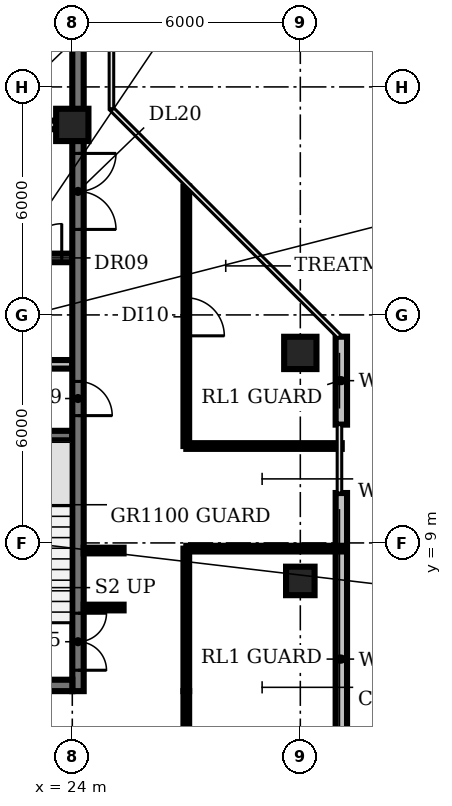
"""IFC4 building model, lengths in metres.
Left out: names, types, materials, properties, quantities, classifications, styles, units other than length and angle.
Written with IfcOpenShell. Run it as: python <this file> out.ifc"""

import sys

from ifc_helpers import new_model, si_unit, direction, frame, frame_2d, origin, origin_2d, place, context, subcontext, project, spatial, rectangle, circle, extrude, element, fill, save


model = new_model("IFC4")
c1 = context("Model", 3, precision=1e-05, world=origin(), true_north=direction((0.0, 1.0)))
c2 = subcontext(c1, "Body", "Model", "MODEL_VIEW")
j1 = project(units=[si_unit("LENGTHUNIT", "METRE"), si_unit("PLANEANGLEUNIT", "RADIAN")], contexts=[c1])
p1 = place(None, origin())
s1 = spatial("IfcSite", under=j1, at=p1, CompositionType="ELEMENT")
p2 = place(p1, origin())
s2 = spatial("IfcBuilding", under=s1, at=p2, CompositionType="ELEMENT")
p3 = place(p2, frame((0.0, 0.0, 285.2)))
s3 = spatial("IfcBuildingStorey", under=s2, at=p3, CompositionType="ELEMENT", Elevation=285.2)
p4 = place(p3, frame((24.0, 20.0, 0.0), z_axis=(0.0, 0.0, 1.0), x_axis=(1.0, 0.0, 0.0)))
e1 = element("IfcColumn", 1, at=p4, inside=s3, PredefinedType="COLUMN", context=c2, shape_type="SweptSolid", body=[
    extrude(circle(Radius=0.425, at=origin_2d()), origin(), (0.0, 0.0, 1.0), 3.85),
])
p5 = place(p3, frame((30.0, 8.0, 0.0), z_axis=(0.0, 0.0, 1.0), x_axis=(1.0, 0.0, 0.0)))
e2 = element("IfcColumn", 2, at=p5, inside=s3, PredefinedType="COLUMN", context=c2, shape_type="SweptSolid", body=[
    extrude(rectangle(XDim=0.75, YDim=0.75, at=origin_2d()), origin(), (0.0, 0.0, 1.0), 3.85),
])
p6 = place(p3, frame((30.0, 14.0, 0.0), z_axis=(0.0, 0.0, 1.0), x_axis=(1.0, 0.0, 0.0)))
e3 = element("IfcColumn", 3, at=p6, inside=s3, PredefinedType="COLUMN", context=c2, shape_type="SweptSolid", body=[
    extrude(circle(Radius=0.425, at=origin_2d()), origin(), (0.0, 0.0, 1.0), 3.85),
])
p7 = place(p3, frame((31.08, 1.573, 0.0), z_axis=(0.0, 0.0, 1.0), x_axis=(0.0, 1.0, 0.0)))
e4 = element("IfcWall", 4, at=p7, inside=s3, PredefinedType="SOLIDWALL", context=c2, shape_type="SweptSolid", body=[
    extrude(rectangle(XDim=8.74, YDim=0.3, at=frame_2d((4.37, 0.0))), origin(), (0.0, 0.0, 1.0), 3.85),
])
p8 = place(p3, frame((31.08, 12.113, 0.0), z_axis=(0.0, 0.0, 1.0), x_axis=(0.0, 1.0, 0.0)))
e5 = element("IfcWall", 5, at=p8, inside=s3, PredefinedType="SOLIDWALL", context=c2, shape_type="SweptSolid", body=[
    extrude(rectangle(XDim=2.313, YDim=0.3, at=frame_2d((1.157, 0.0))), origin(), (0.0, 0.0, 1.0), 3.85),
])
p9 = place(p3, frame((20.85, 11.825, 0.0), z_axis=(0.0, 0.0, 1.0), x_axis=(1.0, 0.0, 0.0)))
e6 = element("IfcWall", 6, at=p9, inside=s3, PredefinedType="SHEAR", context=c2, shape_type="SweptSolid", body=[
    extrude(rectangle(XDim=3.15, YDim=0.25, at=frame_2d((1.575, 0.0))), origin(), (0.0, 0.0, 1.0), 3.85),
])
p10 = place(p3, frame((16.6, 13.7, 0.0), z_axis=(0.0, 0.0, 1.0), x_axis=(1.0, 0.0, 0.0)))
e7 = element("IfcWall", 7, at=p10, inside=s3, PredefinedType="PARTITIONING", context=c2, shape_type="SweptSolid", body=[
    extrude(rectangle(XDim=7.4, YDim=0.225, at=frame_2d((3.7, 0.0))), origin(), (0.0, 0.0, 1.0), 3.85),
])
p11 = place(p3, frame((9.4, 16.5, 0.0), z_axis=(0.0, 0.0, 1.0), x_axis=(1.0, 0.0, 0.0)))
e8 = element("IfcWall", 8, at=p11, inside=s3, PredefinedType="PARTITIONING", context=c2, shape_type="SweptSolid", body=[
    extrude(rectangle(XDim=14.6, YDim=0.225, at=frame_2d((7.3, 0.0))), origin(), (0.0, 0.0, 1.0), 3.85),
])
p12 = place(p11, frame((0.55, 0.0, 0.0)))
e9 = element("IfcOpeningElement", 9, at=p12, cuts=e8, PredefinedType="OPENING", context=c2, shape_type="SweptSolid", body=[
    extrude(rectangle(XDim=0.9, YDim=2.1, at=frame_2d((0.45, 1.05))), frame((0.0, 0.123, 0.0), z_axis=(0.0, -1.0, 0.0), x_axis=(1.0, 0.0, 0.0)), (0.0, 0.0, 1.0), 0.245),
])
p13 = place(p11, frame((6.075, 0.0, 0.0)))
e10 = element("IfcOpeningElement", 10, at=p13, cuts=e8, PredefinedType="OPENING", context=c2, shape_type="SweptSolid", body=[
    extrude(rectangle(XDim=1.0, YDim=2.1, at=frame_2d((0.5, 1.05))), frame((0.0, 0.123, 0.0), z_axis=(0.0, -1.0, 0.0), x_axis=(1.0, 0.0, 0.0)), (0.0, 0.0, 1.0), 0.245),
])
p14 = place(p11, frame((11.647, 0.0, 0.0)))
e11 = element("IfcOpeningElement", 11, at=p14, cuts=e8, PredefinedType="OPENING", context=c2, shape_type="SweptSolid", body=[
    extrude(rectangle(XDim=0.9, YDim=2.1, at=frame_2d((0.45, 1.05))), frame((0.0, 0.123, 0.0), z_axis=(0.0, -1.0, 0.0), x_axis=(1.0, 0.0, 0.0)), (0.0, 0.0, 1.0), 0.245),
])
p15 = place(p11, frame((13.423, 0.0, 0.0)))
e12 = element("IfcOpeningElement", 12, at=p15, cuts=e8, PredefinedType="OPENING", context=c2, shape_type="SweptSolid", body=[
    extrude(rectangle(XDim=0.9, YDim=2.1, at=frame_2d((0.45, 1.05))), frame((0.0, 0.123, 0.0), z_axis=(0.0, -1.0, 0.0), x_axis=(1.0, 0.0, 0.0)), (0.0, 0.0, 1.0), 0.245),
])
p16 = place(p3, frame((24.0, 20.0, 0.0), z_axis=(0.0, 0.0, 1.0), x_axis=(-1.0, 0.0, 0.0)))
e13 = element("IfcWall", 13, at=p16, inside=s3, PredefinedType="PARTITIONING", context=c2, shape_type="SweptSolid", body=[
    extrude(rectangle(XDim=14.6, YDim=0.225, at=frame_2d((7.3, 0.0))), origin(), (0.0, 0.0, 1.0), 3.85),
])
p17 = place(p16, frame((12.75, 0.0, 0.0)))
e14 = element("IfcOpeningElement", 14, at=p17, cuts=e13, PredefinedType="OPENING", context=c2, shape_type="SweptSolid", body=[
    extrude(rectangle(XDim=1.1, YDim=2.1, at=frame_2d((0.55, 1.05))), frame((0.0, 0.123, 0.0), z_axis=(0.0, -1.0, 0.0), x_axis=(1.0, 0.0, 0.0)), (0.0, 0.0, 1.0), 0.245),
])
p18 = place(p16, frame((9.95, 0.0, 0.0)))
e15 = element("IfcOpeningElement", 15, at=p18, cuts=e13, PredefinedType="OPENING", context=c2, shape_type="SweptSolid", body=[
    extrude(rectangle(XDim=1.1, YDim=2.1, at=frame_2d((0.55, 1.05))), frame((0.0, 0.123, 0.0), z_axis=(0.0, -1.0, 0.0), x_axis=(1.0, 0.0, 0.0)), (0.0, 0.0, 1.0), 0.245),
])
p19 = place(p16, frame((7.15, 0.0, 0.0)))
e16 = element("IfcOpeningElement", 16, at=p19, cuts=e13, PredefinedType="OPENING", context=c2, shape_type="SweptSolid", body=[
    extrude(rectangle(XDim=1.1, YDim=2.1, at=frame_2d((0.55, 1.05))), frame((0.0, 0.123, 0.0), z_axis=(0.0, -1.0, 0.0), x_axis=(1.0, 0.0, 0.0)), (0.0, 0.0, 1.0), 0.245),
])
p20 = place(p16, frame((4.35, 0.0, 0.0)))
e17 = element("IfcOpeningElement", 17, at=p20, cuts=e13, PredefinedType="OPENING", context=c2, shape_type="SweptSolid", body=[
    extrude(rectangle(XDim=1.1, YDim=2.1, at=frame_2d((0.55, 1.05))), frame((0.0, 0.123, 0.0), z_axis=(0.0, -1.0, 0.0), x_axis=(1.0, 0.0, 0.0)), (0.0, 0.0, 1.0), 0.245),
])
p21 = place(p16, frame((2.137, 0.0, 0.0)))
e18 = element("IfcOpeningElement", 18, at=p21, cuts=e13, PredefinedType="OPENING", context=c2, shape_type="SweptSolid", body=[
    extrude(rectangle(XDim=0.9, YDim=2.1, at=frame_2d((0.45, 1.05))), frame((0.0, 0.123, 0.0), z_axis=(0.0, -1.0, 0.0), x_axis=(1.0, 0.0, 0.0)), (0.0, 0.0, 1.0), 0.245),
])
p22 = place(p16, frame((0.612, 0.0, 0.0)))
e19 = element("IfcOpeningElement", 19, at=p22, cuts=e13, PredefinedType="OPENING", context=c2, shape_type="SweptSolid", body=[
    extrude(rectangle(XDim=0.9, YDim=2.1, at=frame_2d((0.45, 1.05))), frame((0.0, 0.123, 0.0), z_axis=(0.0, -1.0, 0.0), x_axis=(1.0, 0.0, 0.0)), (0.0, 0.0, 1.0), 0.245),
])
p23 = place(p3, frame((24.15, 25.655, 0.0), z_axis=(0.0, 0.0, 1.0), x_axis=(0.0, -1.0, 0.0)))
e20 = element("IfcWall", 20, at=p23, inside=s3, PredefinedType="SHEAR", context=c2, shape_type="SweptSolid", body=[
    extrude(rectangle(XDim=20.555, YDim=0.3, at=frame_2d((10.277, 0.0))), origin(), (0.0, 0.0, 1.0), 3.85),
])
p24 = place(p23, frame((18.505, 0.0, 0.0)))
e21 = element("IfcOpeningElement", 21, at=p24, cuts=e20, PredefinedType="OPENING", context=c2, shape_type="SweptSolid", body=[
    extrude(rectangle(XDim=1.5, YDim=2.1, at=frame_2d((0.75, 1.05))), frame((0.0, 0.16, 0.0), z_axis=(0.0, -1.0, 0.0), x_axis=(1.0, 0.0, 0.0)), (0.0, 0.0, 1.0), 0.32),
])
p25 = place(p23, frame((12.405, 0.0, 0.0)))
e22 = element("IfcOpeningElement", 22, at=p25, cuts=e20, PredefinedType="OPENING", context=c2, shape_type="SweptSolid", body=[
    extrude(rectangle(XDim=0.9, YDim=2.1, at=frame_2d((0.45, 1.05))), frame((0.0, 0.16, 0.0), z_axis=(0.0, -1.0, 0.0), x_axis=(1.0, 0.0, 0.0)), (0.0, 0.0, 1.0), 0.32),
])
p26 = place(p23, frame((6.405, 0.0, 0.0)))
e23 = element("IfcOpeningElement", 23, at=p26, cuts=e20, PredefinedType="OPENING", context=c2, shape_type="SweptSolid", body=[
    extrude(rectangle(XDim=2.0, YDim=2.1, at=frame_2d((1.0, 1.05))), frame((0.0, 0.16, 0.0), z_axis=(0.0, -1.0, 0.0), x_axis=(1.0, 0.0, 0.0)), (0.0, 0.0, 1.0), 0.32),
])
p27 = place(p3, frame((24.0, 5.25, 0.0), z_axis=(0.0, 0.0, 1.0), x_axis=(-1.0, 0.0, 0.0)))
e24 = element("IfcWall", 24, at=p27, inside=s3, PredefinedType="SHEAR", context=c2, shape_type="SweptSolid", body=[
    extrude(rectangle(XDim=18.0, YDim=0.3, at=frame_2d((9.0, 0.0))), origin(), (0.0, 0.0, 1.0), 3.85),
])
p28 = place(p27, frame((13.0, 0.0, 0.0)))
e25 = element("IfcOpeningElement", 25, at=p28, cuts=e24, PredefinedType="OPENING", context=c2, shape_type="SweptSolid", body=[
    extrude(rectangle(XDim=1.2, YDim=2.1, at=frame_2d((0.6, 1.05))), frame((0.0, 0.16, 0.0), z_axis=(0.0, -1.0, 0.0), x_axis=(1.0, 0.0, 0.0)), (0.0, 0.0, 1.0), 0.32),
])
p29 = place(p27, frame((4.9, 0.0, 0.0)))
e26 = element("IfcOpeningElement", 26, at=p29, cuts=e24, PredefinedType="OPENING", context=c2, shape_type="SweptSolid", body=[
    extrude(rectangle(XDim=1.0, YDim=2.1, at=frame_2d((0.5, 1.05))), frame((0.0, 0.16, 0.0), z_axis=(0.0, -1.0, 0.0), x_axis=(1.0, 0.0, 0.0)), (0.0, 0.0, 1.0), 0.32),
])
for number, where, z_axis, x_axis in (
    (27, (24.3, 7.3, 0.0), (0.0, 0.0, 1.0), (1.0, 0.0, 0.0)),
    (28, (24.3, 8.8, 0.0), (0.0, 0.0, 1.0), (1.0, 0.0, 0.0)),
):
    element("IfcWall", number, at=place(p3, frame(where, z_axis=z_axis, x_axis=x_axis)), inside=s3, PredefinedType="PARTITIONING", context=c2, shape_type="SweptSolid", body=[
        extrude(rectangle(XDim=1.05, YDim=0.15, at=frame_2d((0.525, 0.0))), origin(), (0.0, 0.0, 1.0), 2.9),
    ])
p30 = place(p3, frame((27.0, 5.1, 0.0), z_axis=(0.0, 0.0, 1.0), x_axis=(0.0, -1.0, 0.0)))
e29 = element("IfcWall", 29, at=p30, inside=s3, PredefinedType="PARTITIONING", context=c2, shape_type="SweptSolid", body=[
    extrude(rectangle(XDim=3.9, YDim=0.15, at=frame_2d((1.95, 0.0))), origin(), (0.0, 0.0, 1.0), 2.9),
])
p31 = place(p30, frame((1.5, 0.0, 0.0)))
e30 = element("IfcOpeningElement", 30, at=p31, cuts=e29, PredefinedType="OPENING", context=c2, shape_type="SweptSolid", body=[
    extrude(rectangle(XDim=1.0, YDim=2.1, at=frame_2d((0.5, 1.05))), frame((0.0, 0.085, 0.0), z_axis=(0.0, -1.0, 0.0), x_axis=(1.0, 0.0, 0.0)), (0.0, 0.0, 1.0), 0.17),
])
p32 = place(p3, frame((27.0, 5.1, 0.0), z_axis=(0.0, 0.0, 1.0), x_axis=(0.0, 1.0, 0.0)))
e31 = element("IfcWall", 31, at=p32, inside=s3, PredefinedType="PARTITIONING", context=c2, shape_type="SweptSolid", body=[
    extrude(rectangle(XDim=3.75, YDim=0.15, at=frame_2d((1.875, 0.0))), origin(), (0.0, 0.0, 1.0), 2.9),
])
for number, where, z_axis, x_axis in (
    (32, (27.0, 8.85, 0.0), (0.0, 0.0, 1.0), (1.0, 0.0, 0.0)),
    (33, (27.0, 11.55, 0.0), (0.0, 0.0, 1.0), (1.0, 0.0, 0.0)),
):
    element("IfcWall", number, at=place(p3, frame(where, z_axis=z_axis, x_axis=x_axis)), inside=s3, PredefinedType="PARTITIONING", context=c2, shape_type="SweptSolid", body=[
        extrude(rectangle(XDim=4.09, YDim=0.15, at=frame_2d((2.045, 0.0))), origin(), (0.0, 0.0, 1.0), 2.9),
    ])
p33 = place(p3, frame((27.0, 18.38, 0.0), z_axis=(0.0, 0.0, 1.0), x_axis=(0.0, -1.0, 0.0)))
e34 = element("IfcWall", 34, at=p33, inside=s3, PredefinedType="PARTITIONING", context=c2, shape_type="SweptSolid", body=[
    extrude(rectangle(XDim=6.83, YDim=0.15, at=frame_2d((3.415, 0.0))), origin(), (0.0, 0.0, 1.0), 2.9),
])
p34 = place(p33, frame((2.93, 0.0, 0.0)))
e35 = element("IfcOpeningElement", 35, at=p34, cuts=e34, PredefinedType="OPENING", context=c2, shape_type="SweptSolid", body=[
    extrude(rectangle(XDim=1.0, YDim=2.1, at=frame_2d((0.5, 1.05))), frame((0.0, 0.085, 0.0), z_axis=(0.0, -1.0, 0.0), x_axis=(1.0, 0.0, 0.0)), (0.0, 0.0, 1.0), 0.17),
])
p35 = place(p15, origin())
e36 = element("IfcDoor", 36, at=p35, inside=s3, OperationType="SINGLE_SWING_RIGHT", PredefinedType="DOOR", context=c2, shape_type="SweptSolid", body=[
    extrude(rectangle(XDim=0.9, YDim=2.1, at=frame_2d((0.45, 1.05))), frame((0.0, 0.025, 0.0), z_axis=(0.0, -1.0, 0.0), x_axis=(1.0, 0.0, 0.0)), (0.0, 0.0, 1.0), 0.05),
])
fill(e12, e36)
p36 = place(p24, origin())
e37 = element("IfcDoor", 37, at=p36, inside=s3, OperationType="DOUBLE_DOOR_SINGLE_SWING", PredefinedType="DOOR", context=c2, shape_type="SweptSolid", body=[
    extrude(rectangle(XDim=1.5, YDim=2.1, at=frame_2d((0.75, 1.05))), frame((0.0, 0.025, 0.0), z_axis=(0.0, -1.0, 0.0), x_axis=(1.0, 0.0, 0.0)), (0.0, 0.0, 1.0), 0.05),
])
fill(e21, e37)
p37 = place(p25, origin())
e38 = element("IfcDoor", 38, at=p37, inside=s3, OperationType="SINGLE_SWING_RIGHT", PredefinedType="DOOR", context=c2, shape_type="SweptSolid", body=[
    extrude(rectangle(XDim=0.9, YDim=2.1, at=frame_2d((0.45, 1.05))), frame((0.0, 0.025, 0.0), z_axis=(0.0, -1.0, 0.0), x_axis=(1.0, 0.0, 0.0)), (0.0, 0.0, 1.0), 0.05),
])
fill(e22, e38)
p38 = place(p26, origin())
e39 = element("IfcDoor", 39, at=p38, inside=s3, OperationType="DOUBLE_DOOR_SINGLE_SWING", PredefinedType="DOOR", context=c2, shape_type="SweptSolid", body=[
    extrude(rectangle(XDim=2.0, YDim=2.1, at=frame_2d((1.0, 1.05))), frame((0.0, 0.025, 0.0), z_axis=(0.0, -1.0, 0.0), x_axis=(1.0, 0.0, 0.0)), (0.0, 0.0, 1.0), 0.05),
])
fill(e23, e39)
p39 = place(p34, origin())
e40 = element("IfcDoor", 40, at=p39, inside=s3, OperationType="SINGLE_SWING_RIGHT", PredefinedType="DOOR", context=c2, shape_type="SweptSolid", body=[
    extrude(rectangle(XDim=1.0, YDim=2.1, at=frame_2d((0.5, 1.05))), frame((0.0, 0.025, 0.0), z_axis=(0.0, -1.0, 0.0), x_axis=(1.0, 0.0, 0.0)), (0.0, 0.0, 1.0), 0.05),
])
fill(e35, e40)
save(model, sys.argv[1])
